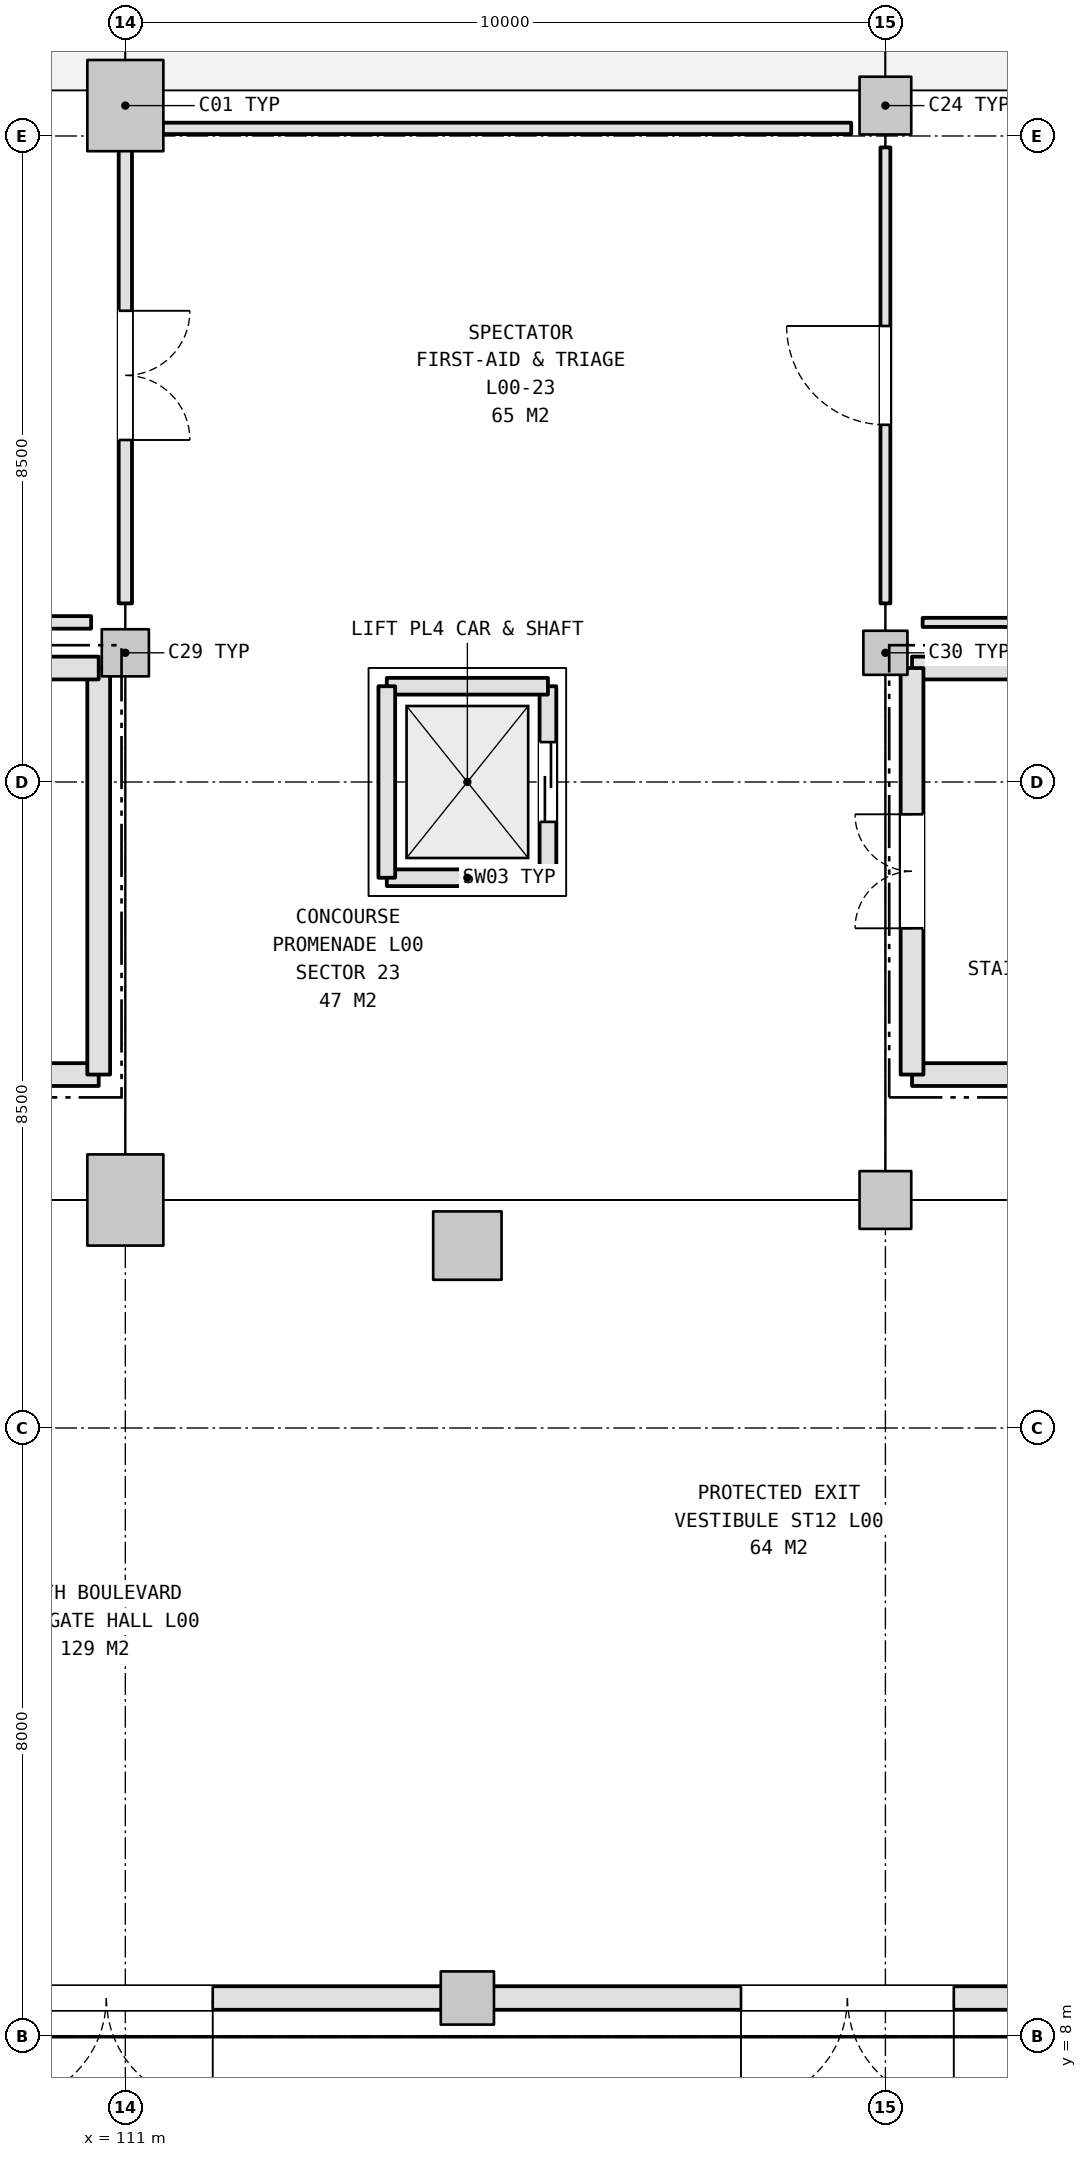
"""IFC4 building model, lengths in metres.
Left out: names, types, materials, properties, quantities, classifications, styles, units other than length and angle.
Written with IfcOpenShell. Run it as: python <this file> out.ifc"""

import sys

from ifc_helpers import new_model, si_unit, direction, frame, frame_2d, origin, origin_2d, place, context, subcontext, project, spatial, rectangle, extrude, element, fill, save


model = new_model("IFC4")
c1 = context("Model", 3, precision=1e-05, world=origin(), true_north=direction((0.0, 1.0)))
c2 = subcontext(c1, "Body", "Model", "MODEL_VIEW")
j1 = project(units=[si_unit("LENGTHUNIT", "METRE"), si_unit("PLANEANGLEUNIT", "RADIAN")], contexts=[c1])
p1 = place(None, origin())
s1 = spatial("IfcSite", under=j1, at=p1, CompositionType="ELEMENT")
p2 = place(p1, origin())
s2 = spatial("IfcBuilding", under=s1, at=p2, CompositionType="ELEMENT")
p3 = place(p2, origin())
s3 = spatial("IfcBuildingStorey", under=s2, at=p3, CompositionType="ELEMENT", Elevation=0.0)
p4 = place(p3, frame((111.0, 33.4, 0.0), z_axis=(0.0, 0.0, 1.0), x_axis=(1.0, 0.0, 0.0)))
e1 = element("IfcColumn", 1, at=p4, inside=s3, PredefinedType="COLUMN", context=c2, shape_type="SweptSolid", body=[
    extrude(rectangle(XDim=1.0, YDim=1.2, at=origin_2d()), origin(), (0.0, 0.0, 1.0), 5.4),
])
p5 = place(p3, frame((111.0, 26.2, 0.0), z_axis=(0.0, 0.0, 1.0), x_axis=(1.0, 0.0, 0.0)))
e2 = element("IfcColumn", 2, at=p5, inside=s3, PredefinedType="COLUMN", context=c2, shape_type="SweptSolid", body=[
    extrude(rectangle(XDim=0.62, YDim=0.62, at=origin_2d()), origin(), (0.0, 0.0, 1.0), 5.4),
])
p6 = place(p3, frame((111.0, 19.0, 0.0), z_axis=(0.0, 0.0, 1.0), x_axis=(1.0, 0.0, 0.0)))
e3 = element("IfcColumn", 3, at=p6, inside=s3, PredefinedType="COLUMN", context=c2, shape_type="SweptSolid", body=[
    extrude(rectangle(XDim=1.0, YDim=1.2, at=origin_2d()), origin(), (0.0, 0.0, 1.0), 5.4),
])
p7 = place(p3, frame((121.0, 33.4, 0.0), z_axis=(0.0, 0.0, 1.0), x_axis=(1.0, 0.0, 0.0)))
e4 = element("IfcColumn", 4, at=p7, inside=s3, PredefinedType="COLUMN", context=c2, shape_type="SweptSolid", body=[
    extrude(rectangle(XDim=0.68, YDim=0.76, at=origin_2d()), origin(), (0.0, 0.0, 1.0), 5.4),
])
p8 = place(p3, frame((121.0, 26.2, 0.0), z_axis=(0.0, 0.0, 1.0), x_axis=(1.0, 0.0, 0.0)))
e5 = element("IfcColumn", 5, at=p8, inside=s3, PredefinedType="COLUMN", context=c2, shape_type="SweptSolid", body=[
    extrude(rectangle(XDim=0.58, YDim=0.58, at=origin_2d()), origin(), (0.0, 0.0, 1.0), 5.4),
])
p9 = place(p3, frame((121.0, 19.0, 0.0), z_axis=(0.0, 0.0, 1.0), x_axis=(1.0, 0.0, 0.0)))
e6 = element("IfcColumn", 6, at=p9, inside=s3, PredefinedType="COLUMN", context=c2, shape_type="SweptSolid", body=[
    extrude(rectangle(XDim=0.68, YDim=0.76, at=origin_2d()), origin(), (0.0, 0.0, 1.0), 5.4),
])
p10 = place(p3, frame((115.5, 8.5, 0.0), z_axis=(0.0, 0.0, 1.0), x_axis=(1.0, 0.0, 0.0)))
e7 = element("IfcColumn", 7, at=p10, inside=s3, PredefinedType="COLUMN", context=c2, shape_type="SweptSolid", body=[
    extrude(rectangle(XDim=0.7, YDim=0.7, at=origin_2d()), origin(), (0.0, 0.0, 1.0), 5.4),
])
p11 = place(p3, frame((115.5, 18.4, 0.0), z_axis=(0.0, 0.0, 1.0), x_axis=(1.0, 0.0, 0.0)))
e8 = element("IfcColumn", 8, at=p11, inside=s3, PredefinedType="COLUMN", context=c2, shape_type="SweptSolid", body=[
    extrude(rectangle(XDim=0.9, YDim=0.9, at=origin_2d()), origin(), (0.0, 0.0, 1.0), 5.4),
])
p12 = place(p3, frame((106.338, 8.5, 0.0), z_axis=(0.0, 0.0, 1.0), x_axis=(1.0, 0.0, 0.0)))
e9 = element("IfcWall", 9, at=p12, inside=s3, PredefinedType="STANDARD", context=c2, shape_type="SweptSolid", body=[
    extrude(rectangle(XDim=8.824, YDim=0.31, at=frame_2d((4.412, 0.0))), origin(), (0.0, 0.0, 1.0), 4.592),
])
p13 = place(p12, frame((3.012, 0.0, 0.0)))
e10 = element("IfcOpeningElement", 10, at=p13, cuts=e9, PredefinedType="OPENING", context=c2, shape_type="SweptSolid", body=[
    extrude(rectangle(XDim=2.8, YDim=2.5, at=frame_2d((1.4, 1.25))), frame((0.0, 0.165, 0.0), z_axis=(0.0, -1.0, 0.0), x_axis=(1.0, 0.0, 0.0)), (0.0, 0.0, 1.0), 0.33),
])
p14 = place(p3, frame((115.838, 8.5, 0.0), z_axis=(0.0, 0.0, 1.0), x_axis=(1.0, 0.0, 0.0)))
e11 = element("IfcWall", 11, at=p14, inside=s3, PredefinedType="STANDARD", context=c2, shape_type="SweptSolid", body=[
    extrude(rectangle(XDim=9.324, YDim=0.31, at=frame_2d((4.662, 0.0))), origin(), (0.0, 0.0, 1.0), 4.592),
])
p15 = place(p14, frame((3.262, 0.0, 0.0)))
e12 = element("IfcOpeningElement", 12, at=p15, cuts=e11, PredefinedType="OPENING", context=c2, shape_type="SweptSolid", body=[
    extrude(rectangle(XDim=2.8, YDim=2.5, at=frame_2d((1.4, 1.25))), frame((0.0, 0.165, 0.0), z_axis=(0.0, -1.0, 0.0), x_axis=(1.0, 0.0, 0.0)), (0.0, 0.0, 1.0), 0.33),
])
for number, where, z_axis, x_axis in (
    (13, (121.35, 20.65, 0.0), (0.0, 0.0, 1.0), (1.0, 0.0, 0.0)),
    (14, (130.65, 26.0, 0.0), (0.0, 0.0, 1.0), (-1.0, 0.0, 0.0)),
):
    element("IfcWall", number, at=place(p3, frame(where, z_axis=z_axis, x_axis=x_axis)), inside=s3, PredefinedType="SHEAR", context=c2, shape_type="SweptSolid", body=[
        extrude(rectangle(XDim=9.299, YDim=0.3, at=frame_2d((4.65, 0.0))), origin(), (0.0, 0.0, 1.0), 5.14),
    ])
p16 = place(p3, frame((121.35, 26.0, 0.0), z_axis=(0.0, 0.0, 1.0), x_axis=(0.0, -1.0, 0.0)))
e15 = element("IfcWall", 15, at=p16, inside=s3, PredefinedType="SHEAR", context=c2, shape_type="SweptSolid", body=[
    extrude(rectangle(XDim=5.349, YDim=0.3, at=frame_2d((2.675, 0.0))), origin(), (0.0, 0.0, 1.0), 5.14),
])
p17 = place(p16, frame((1.925, 0.0, 0.0)))
e16 = element("IfcOpeningElement", 16, at=p17, cuts=e15, PredefinedType="OPENING", context=c2, shape_type="SweptSolid", body=[
    extrude(rectangle(XDim=1.5, YDim=2.2, at=frame_2d((0.75, 1.1))), frame((0.0, 0.16, 0.0), z_axis=(0.0, -1.0, 0.0), x_axis=(1.0, 0.0, 0.0)), (0.0, 0.0, 1.0), 0.32),
])
p18 = place(p3, frame((101.35, 20.65, 0.0), z_axis=(0.0, 0.0, 1.0), x_axis=(1.0, 0.0, 0.0)))
e17 = element("IfcWall", 17, at=p18, inside=s3, PredefinedType="SHEAR", context=c2, shape_type="SweptSolid", body=[
    extrude(rectangle(XDim=9.299, YDim=0.3, at=frame_2d((4.65, 0.0))), origin(), (0.0, 0.0, 1.0), 5.14),
])
p19 = place(p3, frame((110.65, 20.65, 0.0), z_axis=(0.0, 0.0, 1.0), x_axis=(0.0, 1.0, 0.0)))
e18 = element("IfcWall", 18, at=p19, inside=s3, PredefinedType="SHEAR", context=c2, shape_type="SweptSolid", body=[
    extrude(rectangle(XDim=5.349, YDim=0.3, at=frame_2d((2.675, 0.0))), origin(), (0.0, 0.0, 1.0), 5.14),
])
p20 = place(p3, frame((110.65, 26.0, 0.0), z_axis=(0.0, 0.0, 1.0), x_axis=(-1.0, 0.0, 0.0)))
e19 = element("IfcWall", 19, at=p20, inside=s3, PredefinedType="SHEAR", context=c2, shape_type="SweptSolid", body=[
    extrude(rectangle(XDim=9.299, YDim=0.3, at=frame_2d((4.65, 0.0))), origin(), (0.0, 0.0, 1.0), 5.14),
])
p21 = place(p3, frame((114.44, 23.24, -1.1), z_axis=(0.0, 0.0, 1.0), x_axis=(1.0, 0.0, 0.0)))
e20 = element("IfcWall", 20, at=p21, inside=s3, PredefinedType="SHEAR", context=c2, shape_type="SweptSolid", body=[
    extrude(rectangle(XDim=2.12, YDim=0.22, at=frame_2d((1.06, 0.0))), origin(), (0.0, 0.0, 1.0), 6.24),
])
p22 = place(p3, frame((116.56, 23.24, -1.1), z_axis=(0.0, 0.0, 1.0), x_axis=(0.0, 1.0, 0.0)))
e21 = element("IfcWall", 21, at=p22, inside=s3, PredefinedType="SHEAR", context=c2, shape_type="SweptSolid", body=[
    extrude(rectangle(XDim=2.52, YDim=0.22, at=frame_2d((1.26, 0.0))), origin(), (0.0, 0.0, 1.0), 6.24),
])
p23 = place(p22, frame((0.735, 0.0, 1.1)))
e22 = element("IfcOpeningElement", 22, at=p23, cuts=e21, PredefinedType="OPENING", context=c2, shape_type="SweptSolid", body=[
    extrude(rectangle(XDim=1.05, YDim=2.15, at=frame_2d((0.525, 1.075))), frame((0.0, 0.12, 0.0), z_axis=(0.0, -1.0, 0.0), x_axis=(1.0, 0.0, 0.0)), (0.0, 0.0, 1.0), 0.24),
])
p24 = place(p3, frame((116.56, 25.76, -1.1), z_axis=(0.0, 0.0, 1.0), x_axis=(-1.0, 0.0, 0.0)))
e23 = element("IfcWall", 23, at=p24, inside=s3, PredefinedType="SHEAR", context=c2, shape_type="SweptSolid", body=[
    extrude(rectangle(XDim=2.12, YDim=0.22, at=frame_2d((1.06, 0.0))), origin(), (0.0, 0.0, 1.0), 6.24),
])
p25 = place(p3, frame((114.44, 25.76, -1.1), z_axis=(0.0, 0.0, 1.0), x_axis=(0.0, -1.0, 0.0)))
e24 = element("IfcWall", 24, at=p25, inside=s3, PredefinedType="SHEAR", context=c2, shape_type="SweptSolid", body=[
    extrude(rectangle(XDim=2.52, YDim=0.22, at=frame_2d((1.26, 0.0))), origin(), (0.0, 0.0, 1.0), 6.24),
])
p26 = place(p3, frame((111.0, 32.85, 0.0), z_axis=(0.0, 0.0, 1.0), x_axis=(0.0, -1.0, 0.0)))
e25 = element("IfcWall", 25, at=p26, inside=s3, PredefinedType="PARTITIONING", context=c2, shape_type="SweptSolid", body=[
    extrude(rectangle(XDim=6.0, YDim=0.175, at=frame_2d((3.0, 0.0))), origin(), (0.0, 0.0, 1.0), 4.375),
])
p27 = place(p26, frame((2.15, 0.0, 0.0)))
e26 = element("IfcOpeningElement", 26, at=p27, cuts=e25, PredefinedType="OPENING", context=c2, shape_type="SweptSolid", body=[
    extrude(rectangle(XDim=1.7, YDim=2.25, at=frame_2d((0.85, 1.125))), frame((0.0, 0.097, 0.0), z_axis=(0.0, -1.0, 0.0), x_axis=(1.0, 0.0, 0.0)), (0.0, 0.0, 1.0), 0.195),
])
p28 = place(p3, frame((110.55, 26.6, 0.0), z_axis=(0.0, 0.0, 1.0), x_axis=(-1.0, 0.0, 0.0)))
e27 = element("IfcWall", 27, at=p28, inside=s3, PredefinedType="PARTITIONING", context=c2, shape_type="SweptSolid", body=[
    extrude(rectangle(XDim=9.06, YDim=0.165, at=frame_2d((4.53, 0.0))), origin(), (0.0, 0.0, 1.0), 5.12),
])
p29 = place(p3, frame((121.0, 32.85, 0.0), z_axis=(0.0, 0.0, 1.0), x_axis=(0.0, -1.0, 0.0)))
e28 = element("IfcWall", 28, at=p29, inside=s3, PredefinedType="PARTITIONING", context=c2, shape_type="SweptSolid", body=[
    extrude(rectangle(XDim=6.0, YDim=0.13, at=frame_2d((3.0, 0.0))), origin(), (0.0, 0.0, 1.0), 4.365),
])
p30 = place(p29, frame((2.35, 0.0, 0.0)))
e29 = element("IfcOpeningElement", 29, at=p30, cuts=e28, PredefinedType="OPENING", context=c2, shape_type="SweptSolid", body=[
    extrude(rectangle(XDim=1.3, YDim=2.2, at=frame_2d((0.65, 1.1))), frame((0.0, 0.075, 0.0), z_axis=(0.0, -1.0, 0.0), x_axis=(1.0, 0.0, 0.0)), (0.0, 0.0, 1.0), 0.15),
])
p31 = place(p3, frame((111.49, 33.1, 0.0), z_axis=(0.0, 0.0, 1.0), x_axis=(1.0, 0.0, 0.0)))
e30 = element("IfcWall", 30, at=p31, inside=s3, PredefinedType="PARTITIONING", context=c2, shape_type="SweptSolid", body=[
    extrude(rectangle(XDim=9.06, YDim=0.15, at=frame_2d((4.53, 0.0))), origin(), (0.0, 0.0, 1.0), 4.325),
])
p32 = place(p3, frame((130.55, 26.6, 0.0), z_axis=(0.0, 0.0, 1.0), x_axis=(-1.0, 0.0, 0.0)))
e31 = element("IfcWall", 31, at=p32, inside=s3, PredefinedType="PARTITIONING", context=c2, shape_type="SweptSolid", body=[
    extrude(rectangle(XDim=9.06, YDim=0.12, at=frame_2d((4.53, 0.0))), origin(), (0.0, 0.0, 1.0), 5.12),
])
p33 = place(p13, frame((2.8, 0.0, 0.0), z_axis=(0.0, 0.0, 1.0), x_axis=(-1.0, 0.0, 0.0)))
e32 = element("IfcDoor", 32, at=p33, inside=s3, OperationType="DOUBLE_DOOR_SINGLE_SWING", PredefinedType="DOOR", context=c2, shape_type="SweptSolid", body=[
    extrude(rectangle(XDim=2.8, YDim=2.5, at=frame_2d((1.4, 1.25))), frame((0.0, 0.025, 0.0), z_axis=(0.0, -1.0, 0.0), x_axis=(1.0, 0.0, 0.0)), (0.0, 0.0, 1.0), 0.05),
])
fill(e10, e32)
p34 = place(p15, frame((2.8, 0.0, 0.0), z_axis=(0.0, 0.0, 1.0), x_axis=(-1.0, 0.0, 0.0)))
e33 = element("IfcDoor", 33, at=p34, inside=s3, OperationType="DOUBLE_DOOR_SINGLE_SWING", PredefinedType="DOOR", context=c2, shape_type="SweptSolid", body=[
    extrude(rectangle(XDim=2.8, YDim=2.5, at=frame_2d((1.4, 1.25))), frame((0.0, 0.025, 0.0), z_axis=(0.0, -1.0, 0.0), x_axis=(1.0, 0.0, 0.0)), (0.0, 0.0, 1.0), 0.05),
])
fill(e12, e33)
p35 = place(p17, frame((1.5, 0.0, 0.0), z_axis=(0.0, 0.0, 1.0), x_axis=(-1.0, 0.0, 0.0)))
e34 = element("IfcDoor", 34, at=p35, inside=s3, OperationType="DOUBLE_DOOR_SINGLE_SWING", PredefinedType="DOOR", context=c2, shape_type="SweptSolid", body=[
    extrude(rectangle(XDim=1.5, YDim=2.2, at=frame_2d((0.75, 1.1))), frame((0.0, 0.025, 0.0), z_axis=(0.0, -1.0, 0.0), x_axis=(1.0, 0.0, 0.0)), (0.0, 0.0, 1.0), 0.05),
])
fill(e16, e34)
p36 = place(p23, origin())
e35 = element("IfcDoor", 35, at=p36, inside=s3, OperationType="DOUBLE_DOOR_SLIDING", PredefinedType="DOOR", context=c2, shape_type="SweptSolid", body=[
    extrude(rectangle(XDim=1.05, YDim=2.15, at=frame_2d((0.525, 1.075))), frame((0.0, 0.025, 0.0), z_axis=(0.0, -1.0, 0.0), x_axis=(1.0, 0.0, 0.0)), (0.0, 0.0, 1.0), 0.05),
])
fill(e22, e35)
p37 = place(p27, origin())
e36 = element("IfcDoor", 36, at=p37, inside=s3, OperationType="DOUBLE_DOOR_SINGLE_SWING", PredefinedType="DOOR", context=c2, shape_type="SweptSolid", body=[
    extrude(rectangle(XDim=1.7, YDim=2.25, at=frame_2d((0.85, 1.125))), frame((0.0, 0.025, 0.0), z_axis=(0.0, -1.0, 0.0), x_axis=(1.0, 0.0, 0.0)), (0.0, 0.0, 1.0), 0.05),
])
fill(e26, e36)
p38 = place(p30, frame((1.3, 0.0, 0.0), z_axis=(0.0, 0.0, 1.0), x_axis=(-1.0, 0.0, 0.0)))
e37 = element("IfcDoor", 37, at=p38, inside=s3, OperationType="SINGLE_SWING_LEFT", PredefinedType="DOOR", context=c2, shape_type="SweptSolid", body=[
    extrude(rectangle(XDim=1.3, YDim=2.2, at=frame_2d((0.65, 1.1))), frame((0.0, 0.025, 0.0), z_axis=(0.0, -1.0, 0.0), x_axis=(1.0, 0.0, 0.0)), (0.0, 0.0, 1.0), 0.05),
])
fill(e29, e37)
save(model, sys.argv[1])
